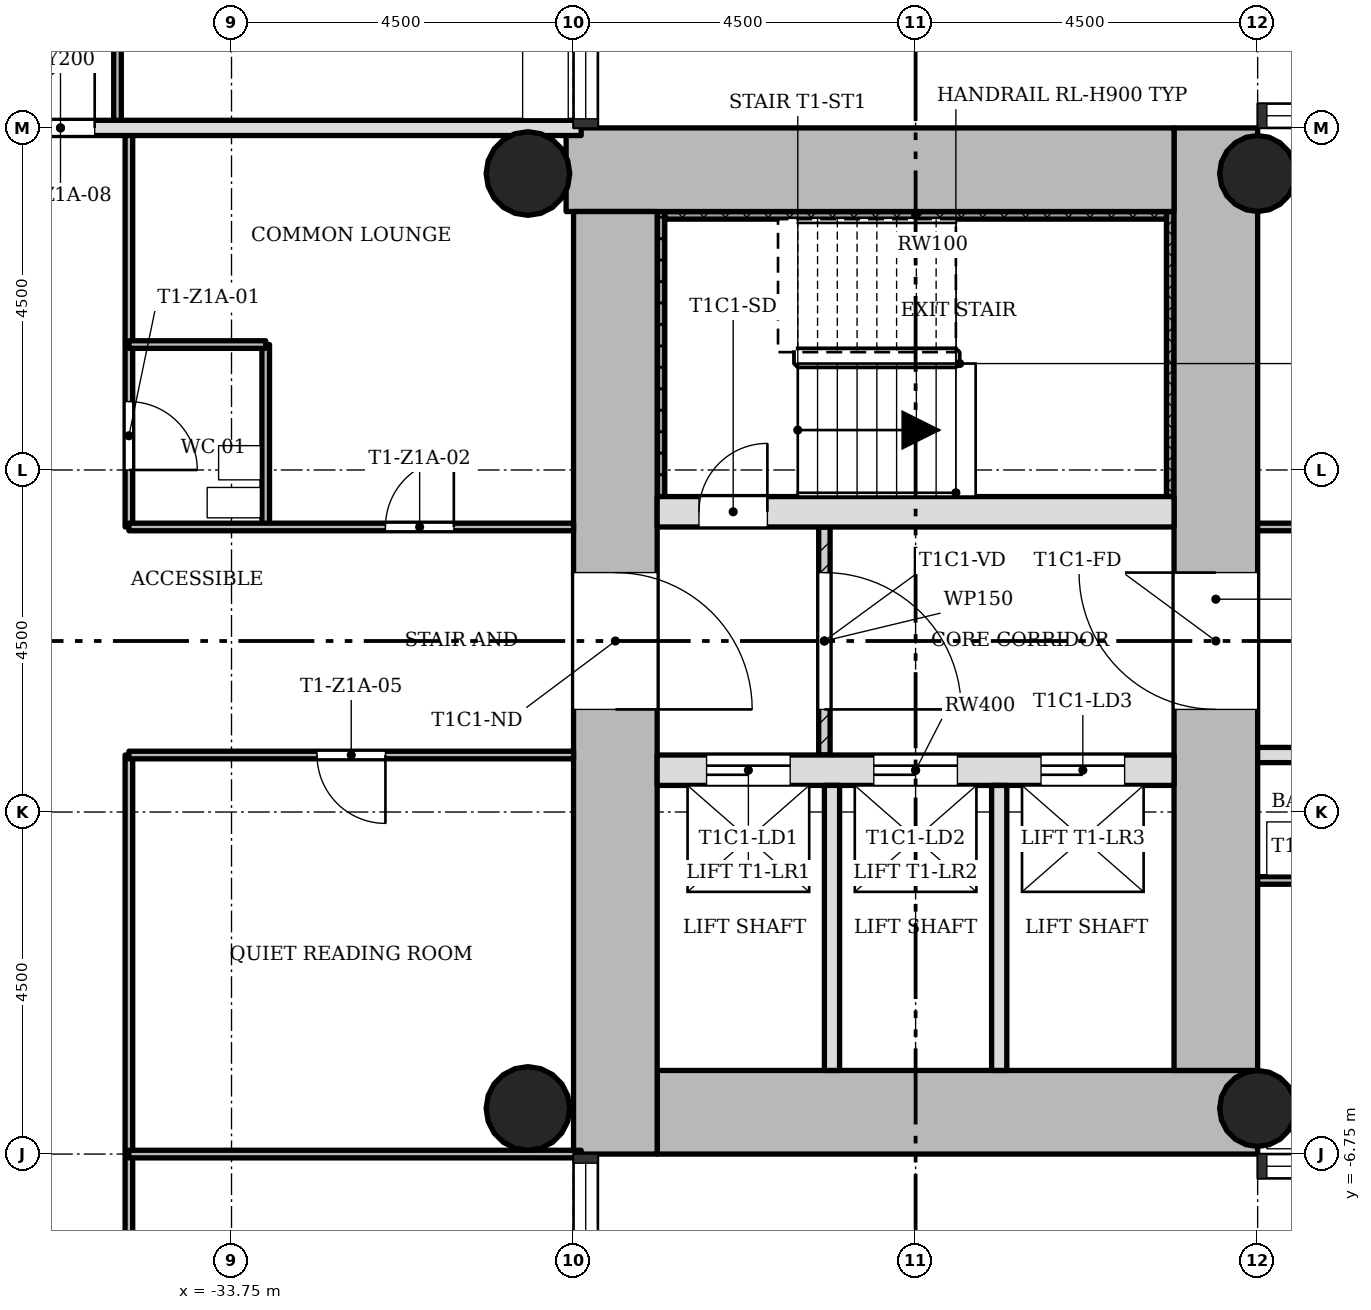
"""IFC4 building model, lengths in metres.
Left out: names, types, materials, properties, quantities, classifications, styles, units other than length and angle.
Written with IfcOpenShell. Run it as: python <this file> out.ifc"""

import sys

from ifc_helpers import new_model, si_unit, direction, frame, frame_2d, origin, origin_2d, place, context, subcontext, project, spatial, rectangle, hollow_circle, extrude, element, fill, save


model = new_model("IFC4")
c1 = context("Model", 3, precision=1e-05, world=origin(), true_north=direction((0.0, 1.0)))
c2 = subcontext(c1, "Body", "Model", "MODEL_VIEW")
j1 = project(units=[si_unit("LENGTHUNIT", "METRE"), si_unit("PLANEANGLEUNIT", "RADIAN")], contexts=[c1])
p1 = place(None, origin())
s1 = spatial("IfcSite", under=j1, at=p1, CompositionType="ELEMENT")
p2 = place(p1, origin())
s2 = spatial("IfcBuilding", under=s1, at=p2, CompositionType="ELEMENT")
p3 = place(p2, frame((0.0, 0.0, 27.9)))
s3 = spatial("IfcBuildingStorey", under=s2, at=p3, CompositionType="ELEMENT", Elevation=27.9)
p4 = place(p3, frame((-28.15, -6.2, 0.0), z_axis=(0.0, 0.0, 1.0), x_axis=(1.0, 0.0, 0.0)))
e1 = element("IfcWall", 1, at=p4, inside=s3, PredefinedType="SHEAR", context=c2, shape_type="SweptSolid", body=[
    extrude(rectangle(XDim=7.9, YDim=1.1, at=frame_2d((3.95, 0.0))), origin(), (0.0, 0.0, 1.0), 3.4),
])
p5 = place(p3, frame((-20.8, -5.65, 0.0), z_axis=(0.0, 0.0, 1.0), x_axis=(0.0, 1.0, 0.0)))
e2 = element("IfcWall", 2, at=p5, inside=s3, PredefinedType="SHEAR", context=c2, shape_type="SweptSolid", body=[
    extrude(rectangle(XDim=12.4, YDim=1.1, at=frame_2d((6.2, 0.0))), origin(), (0.0, 0.0, 1.0), 3.4),
])
p6 = place(p5, frame((4.75, 0.0, 0.0)))
e3 = element("IfcOpeningElement", 3, at=p6, cuts=e2, PredefinedType="OPENING", context=c2, shape_type="SweptSolid", body=[
    extrude(rectangle(XDim=1.8, YDim=2.1, at=frame_2d((0.9, 1.05))), frame((0.0, 0.56, 0.0), z_axis=(0.0, -1.0, 0.0), x_axis=(1.0, 0.0, 0.0)), (0.0, 0.0, 1.0), 1.12),
])
p7 = place(p3, frame((-21.35, 6.2, 0.0), z_axis=(0.0, 0.0, 1.0), x_axis=(-1.0, 0.0, 0.0)))
e4 = element("IfcWall", 4, at=p7, inside=s3, PredefinedType="SHEAR", context=c2, shape_type="SweptSolid", body=[
    extrude(rectangle(XDim=7.998, YDim=1.1, at=frame_2d((3.999, 0.0))), origin(), (0.0, 0.0, 1.0), 3.4),
])
p8 = place(p3, frame((-28.7, 5.65, 0.0), z_axis=(0.0, 0.0, 1.0), x_axis=(0.0, -1.0, 0.0)))
e5 = element("IfcWall", 5, at=p8, inside=s3, PredefinedType="SHEAR", context=c2, shape_type="SweptSolid", body=[
    extrude(rectangle(XDim=12.4, YDim=1.1, at=frame_2d((6.2, 0.0))), origin(), (0.0, 0.0, 1.0), 3.4),
])
p9 = place(p8, frame((4.75, 0.0, 0.0)))
e6 = element("IfcOpeningElement", 6, at=p9, cuts=e5, PredefinedType="OPENING", context=c2, shape_type="SweptSolid", body=[
    extrude(rectangle(XDim=1.8, YDim=2.1, at=frame_2d((0.9, 1.05))), frame((0.0, 0.56, 0.0), z_axis=(0.0, -1.0, 0.0), x_axis=(1.0, 0.0, 0.0)), (0.0, 0.0, 1.0), 1.12),
])
p10 = place(p3, frame((-28.15, -1.7, 0.0), z_axis=(0.0, 0.0, 1.0), x_axis=(1.0, 0.0, 0.0)))
e7 = element("IfcWall", 7, at=p10, inside=s3, PredefinedType="SHEAR", context=c2, shape_type="SweptSolid", body=[
    extrude(rectangle(XDim=6.8, YDim=0.4, at=frame_2d((3.4, 0.0))), origin(), (0.0, 0.0, 1.0), 3.4),
])
p11 = place(p10, frame((0.65, 0.0, 0.0)))
e8 = element("IfcOpeningElement", 8, at=p11, cuts=e7, PredefinedType="OPENING", context=c2, shape_type="SweptSolid", body=[
    extrude(rectangle(XDim=1.1, YDim=2.1, at=frame_2d((0.55, 1.05))), frame((0.0, 0.21, 0.0), z_axis=(0.0, -1.0, 0.0), x_axis=(1.0, 0.0, 0.0)), (0.0, 0.0, 1.0), 0.42),
])
p12 = place(p10, frame((2.85, 0.0, 0.0)))
e9 = element("IfcOpeningElement", 9, at=p12, cuts=e7, PredefinedType="OPENING", context=c2, shape_type="SweptSolid", body=[
    extrude(rectangle(XDim=1.1, YDim=2.1, at=frame_2d((0.55, 1.05))), frame((0.0, 0.21, 0.0), z_axis=(0.0, -1.0, 0.0), x_axis=(1.0, 0.0, 0.0)), (0.0, 0.0, 1.0), 0.42),
])
p13 = place(p10, frame((5.05, 0.0, 0.0)))
e10 = element("IfcOpeningElement", 10, at=p13, cuts=e7, PredefinedType="OPENING", context=c2, shape_type="SweptSolid", body=[
    extrude(rectangle(XDim=1.1, YDim=2.1, at=frame_2d((0.55, 1.05))), frame((0.0, 0.21, 0.0), z_axis=(0.0, -1.0, 0.0), x_axis=(1.0, 0.0, 0.0)), (0.0, 0.0, 1.0), 0.42),
])
p14 = place(p3, frame((-28.15, 1.7, 0.0), z_axis=(0.0, 0.0, 1.0), x_axis=(1.0, 0.0, 0.0)))
e11 = element("IfcWall", 11, at=p14, inside=s3, PredefinedType="SHEAR", context=c2, shape_type="SweptSolid", body=[
    extrude(rectangle(XDim=6.8, YDim=0.4, at=frame_2d((3.4, 0.0))), origin(), (0.0, 0.0, 1.0), 3.4),
])
p15 = place(p14, frame((0.55, 0.0, 0.0)))
e12 = element("IfcOpeningElement", 12, at=p15, cuts=e11, PredefinedType="OPENING", context=c2, shape_type="SweptSolid", body=[
    extrude(rectangle(XDim=0.9, YDim=2.1, at=frame_2d((0.45, 1.05))), frame((0.0, 0.21, 0.0), z_axis=(0.0, -1.0, 0.0), x_axis=(1.0, 0.0, 0.0)), (0.0, 0.0, 1.0), 0.42),
])
for number, where, z_axis, x_axis in (
    (13, (-20.25, -6.15, 0.0), (0.0, 0.0, 1.0), (1.0, 0.0, 0.0)),
    (14, (-20.25, 6.15, 0.0), (0.0, 0.0, 1.0), (1.0, 0.0, 0.0)),
):
    element("IfcColumn", number, at=place(p3, frame(where, z_axis=z_axis, x_axis=x_axis)), inside=s3, PredefinedType="COLUMN", context=c2, shape_type="SweptSolid", body=[
        extrude(hollow_circle(Radius=0.5, WallThickness=0.036, at=origin_2d()), origin(), (0.0, 0.0, 1.0), 3.4),
    ])
for number, where, z_axis, x_axis in (
    (15, (-29.85, -6.15, 0.0), (0.0, 0.0, 1.0), (1.0, 0.0, 0.0)),
    (16, (-29.85, 6.15, 0.0), (0.0, 0.0, 1.0), (1.0, 0.0, 0.0)),
):
    element("IfcColumn", number, at=place(p3, frame(where, z_axis=z_axis, x_axis=x_axis)), inside=s3, PredefinedType="COLUMN", context=c2, shape_type="SweptSolid", body=[
        extrude(hollow_circle(Radius=0.55, WallThickness=0.04, at=origin_2d()), origin(), (0.0, 0.0, 1.0), 3.4),
    ])
p16 = place(p3, frame((-25.95, -1.5, 0.0), z_axis=(0.0, 0.0, 1.0), x_axis=(0.0, 1.0, 0.0)))
e17 = element("IfcWall", 17, at=p16, inside=s3, PredefinedType="PARTITIONING", context=c2, shape_type="SweptSolid", body=[
    extrude(rectangle(XDim=3.0, YDim=0.15, at=frame_2d((1.5, 0.0))), origin(), (0.0, 0.0, 1.0), 3.0),
])
p17 = place(p16, frame((0.6, 0.0, 0.0)))
e18 = element("IfcOpeningElement", 18, at=p17, cuts=e17, PredefinedType="OPENING", context=c2, shape_type="SweptSolid", body=[
    extrude(rectangle(XDim=1.8, YDim=2.1, at=frame_2d((0.9, 1.05))), frame((0.0, 0.085, 0.0), z_axis=(0.0, -1.0, 0.0), x_axis=(1.0, 0.0, 0.0)), (0.0, 0.0, 1.0), 0.17),
])
for number, where, z_axis, x_axis in (
    (19, (-25.85, -5.65, 0.0), (0.0, 0.0, 1.0), (0.0, 1.0, 0.0)),
    (20, (-23.65, -5.65, 0.0), (0.0, 0.0, 1.0), (0.0, 1.0, 0.0)),
):
    element("IfcWall", number, at=place(p3, frame(where, z_axis=z_axis, x_axis=x_axis)), inside=s3, PredefinedType="SOLIDWALL", context=c2, shape_type="SweptSolid", body=[
        extrude(rectangle(XDim=3.75, YDim=0.2, at=frame_2d((1.875, 0.0))), origin(), (0.0, 0.0, 1.0), 3.0),
    ])
p18 = place(p3, frame((-35.25, 6.75, 0.0), z_axis=(0.0, 0.0, 1.0), x_axis=(0.0, 1.0, 0.0)))
e21 = element("IfcWall", 21, at=p18, inside=s3, PredefinedType="PARTITIONING", context=c2, shape_type="SweptSolid", body=[
    extrude(rectangle(XDim=4.5, YDim=0.1, at=frame_2d((2.25, 0.0))), origin(), (0.0, 0.0, 1.0), 3.0),
])
p19 = place(p18, frame((1.8, 0.0, 0.0)))
e22 = element("IfcOpeningElement", 22, at=p19, cuts=e21, PredefinedType="OPENING", context=c2, shape_type="SweptSolid", body=[
    extrude(rectangle(XDim=0.9, YDim=2.1, at=frame_2d((0.45, 1.05))), frame((0.0, 0.06, 0.0), z_axis=(0.0, -1.0, 0.0), x_axis=(1.0, 0.0, 0.0)), (0.0, 0.0, 1.0), 0.12),
])
p20 = place(p3, frame((-35.1, -8.55, 0.0), z_axis=(0.0, 0.0, 1.0), x_axis=(0.0, 1.0, 0.0)))
e23 = element("IfcWall", 23, at=p20, inside=s3, PredefinedType="PARTITIONING", context=c2, shape_type="SweptSolid", body=[
    extrude(rectangle(XDim=7.05, YDim=0.1, at=frame_2d((3.525, 0.0))), origin(), (0.0, 0.0, 1.0), 3.0),
])
p21 = place(p3, frame((-35.1, 1.5, 0.0), z_axis=(0.0, 0.0, 1.0), x_axis=(0.0, 1.0, 0.0)))
e24 = element("IfcWall", 24, at=p21, inside=s3, PredefinedType="PARTITIONING", context=c2, shape_type="SweptSolid", body=[
    extrude(rectangle(XDim=5.25, YDim=0.1, at=frame_2d((2.625, 0.0))), origin(), (0.0, 0.0, 1.0), 3.0),
])
p22 = place(p21, frame((0.75, 0.0, 0.0)))
e25 = element("IfcOpeningElement", 25, at=p22, cuts=e24, PredefinedType="OPENING", context=c2, shape_type="SweptSolid", body=[
    extrude(rectangle(XDim=0.9, YDim=2.1, at=frame_2d((0.45, 1.05))), frame((0.0, 0.06, 0.0), z_axis=(0.0, -1.0, 0.0), x_axis=(1.0, 0.0, 0.0)), (0.0, 0.0, 1.0), 0.12),
])
p23 = place(p3, frame((-33.3, 1.5, 0.0), z_axis=(0.0, 0.0, 1.0), x_axis=(0.0, 1.0, 0.0)))
e26 = element("IfcWall", 26, at=p23, inside=s3, PredefinedType="PARTITIONING", context=c2, shape_type="SweptSolid", body=[
    extrude(rectangle(XDim=2.4, YDim=0.1, at=frame_2d((1.2, 0.0))), origin(), (0.0, 0.0, 1.0), 3.0),
])
p24 = place(p3, frame((-35.1, -6.75, 0.0), z_axis=(0.0, 0.0, 1.0), x_axis=(1.0, 0.0, 0.0)))
e27 = element("IfcWall", 27, at=p24, inside=s3, PredefinedType="PARTITIONING", context=c2, shape_type="SweptSolid", body=[
    extrude(rectangle(XDim=5.95, YDim=0.1, at=frame_2d((2.975, 0.0))), origin(), (0.0, 0.0, 1.0), 3.0),
])
p25 = place(p3, frame((-20.25, -3.15, 0.0), z_axis=(0.0, 0.0, 1.0), x_axis=(1.0, 0.0, 0.0)))
e28 = element("IfcWall", 28, at=p25, inside=s3, PredefinedType="PARTITIONING", context=c2, shape_type="SweptSolid", body=[
    extrude(rectangle(XDim=4.5, YDim=0.1, at=frame_2d((2.25, 0.0))), origin(), (0.0, 0.0, 1.0), 3.0),
])
p26 = place(p25, frame((3.0, 0.0, 0.0)))
e29 = element("IfcOpeningElement", 29, at=p26, cuts=e28, PredefinedType="OPENING", context=c2, shape_type="SweptSolid", body=[
    extrude(rectangle(XDim=0.9, YDim=2.1, at=frame_2d((0.45, 1.05))), frame((0.0, 0.06, 0.0), z_axis=(0.0, -1.0, 0.0), x_axis=(1.0, 0.0, 0.0)), (0.0, 0.0, 1.0), 0.12),
])
p27 = place(p3, frame((-35.1, -1.5, 0.0), z_axis=(0.0, 0.0, 1.0), x_axis=(1.0, 0.0, 0.0)))
e30 = element("IfcWall", 30, at=p27, inside=s3, PredefinedType="PARTITIONING", context=c2, shape_type="SweptSolid", body=[
    extrude(rectangle(XDim=5.85, YDim=0.1, at=frame_2d((2.925, 0.0))), origin(), (0.0, 0.0, 1.0), 3.0),
])
p28 = place(p27, frame((2.475, 0.0, 0.0)))
e31 = element("IfcOpeningElement", 31, at=p28, cuts=e30, PredefinedType="OPENING", context=c2, shape_type="SweptSolid", body=[
    extrude(rectangle(XDim=0.9, YDim=2.1, at=frame_2d((0.45, 1.05))), frame((0.0, 0.06, 0.0), z_axis=(0.0, -1.0, 0.0), x_axis=(1.0, 0.0, 0.0)), (0.0, 0.0, 1.0), 0.12),
])
p29 = place(p3, frame((-20.25, -1.5, 0.0), z_axis=(0.0, 0.0, 1.0), x_axis=(1.0, 0.0, 0.0)))
e32 = element("IfcWall", 32, at=p29, inside=s3, PredefinedType="SOLIDWALL", context=c2, shape_type="SweptSolid", body=[
    extrude(rectangle(XDim=4.5, YDim=0.2, at=frame_2d((2.25, 0.0))), origin(), (0.0, 0.0, 1.0), 3.0),
])
p30 = place(p29, frame((3.0, 0.0, 0.0)))
e33 = element("IfcOpeningElement", 33, at=p30, cuts=e32, PredefinedType="OPENING", context=c2, shape_type="SweptSolid", body=[
    extrude(rectangle(XDim=0.9, YDim=2.1, at=frame_2d((0.45, 1.05))), frame((0.0, 0.11, 0.0), z_axis=(0.0, -1.0, 0.0), x_axis=(1.0, 0.0, 0.0)), (0.0, 0.0, 1.0), 0.22),
])
p31 = place(p3, frame((-35.1, 1.5, 0.0), z_axis=(0.0, 0.0, 1.0), x_axis=(1.0, 0.0, 0.0)))
e34 = element("IfcWall", 34, at=p31, inside=s3, PredefinedType="PARTITIONING", context=c2, shape_type="SweptSolid", body=[
    extrude(rectangle(XDim=5.85, YDim=0.1, at=frame_2d((2.925, 0.0))), origin(), (0.0, 0.0, 1.0), 3.0),
])
p32 = place(p31, frame((3.375, 0.0, 0.0)))
e35 = element("IfcOpeningElement", 35, at=p32, cuts=e34, PredefinedType="OPENING", context=c2, shape_type="SweptSolid", body=[
    extrude(rectangle(XDim=0.9, YDim=2.1, at=frame_2d((0.45, 1.05))), frame((0.0, 0.06, 0.0), z_axis=(0.0, -1.0, 0.0), x_axis=(1.0, 0.0, 0.0)), (0.0, 0.0, 1.0), 0.12),
])
p33 = place(p3, frame((-20.25, 1.5, 0.0), z_axis=(0.0, 0.0, 1.0), x_axis=(1.0, 0.0, 0.0)))
e36 = element("IfcWall", 36, at=p33, inside=s3, PredefinedType="PARTITIONING", context=c2, shape_type="SweptSolid", body=[
    extrude(rectangle(XDim=4.5, YDim=0.1, at=frame_2d((2.25, 0.0))), origin(), (0.0, 0.0, 1.0), 3.0),
])
p34 = place(p33, frame((1.8, 0.0, 0.0)))
e37 = element("IfcOpeningElement", 37, at=p34, cuts=e36, PredefinedType="OPENING", context=c2, shape_type="SweptSolid", body=[
    extrude(rectangle(XDim=0.9, YDim=2.1, at=frame_2d((0.45, 1.05))), frame((0.0, 0.06, 0.0), z_axis=(0.0, -1.0, 0.0), x_axis=(1.0, 0.0, 0.0)), (0.0, 0.0, 1.0), 0.12),
])
p35 = place(p3, frame((-35.1, 3.9, 0.0), z_axis=(0.0, 0.0, 1.0), x_axis=(1.0, 0.0, 0.0)))
e38 = element("IfcWall", 38, at=p35, inside=s3, PredefinedType="PARTITIONING", context=c2, shape_type="SweptSolid", body=[
    extrude(rectangle(XDim=1.8, YDim=0.1, at=frame_2d((0.9, 0.0))), origin(), (0.0, 0.0, 1.0), 3.0),
])
p36 = place(p3, frame((-42.85, 6.75, 0.0), z_axis=(0.0, 0.0, 1.0), x_axis=(1.0, 0.0, 0.0)))
e39 = element("IfcWall", 39, at=p36, inside=s3, PredefinedType="SOLIDWALL", context=c2, shape_type="SweptSolid", body=[
    extrude(rectangle(XDim=13.7, YDim=0.2, at=frame_2d((6.85, 0.0))), origin(), (0.0, 0.0, 1.0), 3.0),
])
p37 = place(p36, frame((6.4, 0.0, 0.0)))
e40 = element("IfcOpeningElement", 40, at=p37, cuts=e39, PredefinedType="OPENING", context=c2, shape_type="SweptSolid", body=[
    extrude(rectangle(XDim=0.9, YDim=2.1, at=frame_2d((0.45, 1.05))), frame((0.0, 0.11, 0.0), z_axis=(0.0, -1.0, 0.0), x_axis=(1.0, 0.0, 0.0)), (0.0, 0.0, 1.0), 0.22),
])
p38 = place(p3, frame((-21.4, 1.9, 0.0), z_axis=(0.0, 0.0, 1.0), x_axis=(0.0, 1.0, 0.0)))
e41 = element("IfcWall", 41, at=p38, inside=s3, PredefinedType="SHEAR", context=c2, shape_type="SweptSolid", body=[
    extrude(rectangle(XDim=3.75, YDim=0.1, at=frame_2d((1.875, 0.0))), origin(), (0.0, 0.0, 1.0), 3.4),
])
p39 = place(p3, frame((-28.05, 5.6, 0.0), z_axis=(0.0, 0.0, 1.0), x_axis=(1.0, 0.0, 0.0)))
e42 = element("IfcWall", 42, at=p39, inside=s3, PredefinedType="SHEAR", context=c2, shape_type="SweptSolid", body=[
    extrude(rectangle(XDim=6.6, YDim=0.1, at=frame_2d((3.3, 0.0))), origin(), (0.0, 0.0, 1.0), 3.4),
])
p40 = place(p3, frame((-28.1, 1.9, 0.0), z_axis=(0.0, 0.0, 1.0), x_axis=(0.0, 1.0, 0.0)))
e43 = element("IfcWall", 43, at=p40, inside=s3, PredefinedType="SHEAR", context=c2, shape_type="SweptSolid", body=[
    extrude(rectangle(XDim=3.75, YDim=0.1, at=frame_2d((1.875, 0.0))), origin(), (0.0, 0.0, 1.0), 3.4),
])
p41 = place(p17, origin())
e44 = element("IfcDoor", 44, at=p41, inside=s3, OperationType="SINGLE_SWING_LEFT", PredefinedType="DOOR", context=c2, shape_type="SweptSolid", body=[
    extrude(rectangle(XDim=1.8, YDim=2.1, at=frame_2d((0.9, 1.05))), frame((0.0, 0.025, 0.0), z_axis=(0.0, -1.0, 0.0), x_axis=(1.0, 0.0, 0.0)), (0.0, 0.0, 1.0), 0.05),
])
fill(e18, e44)
p42 = place(p22, origin())
e45 = element("IfcDoor", 45, at=p42, inside=s3, OperationType="SINGLE_SWING_LEFT", PredefinedType="DOOR", context=c2, shape_type="SweptSolid", body=[
    extrude(rectangle(XDim=0.9, YDim=2.1, at=frame_2d((0.45, 1.05))), frame((0.0, 0.025, 0.0), z_axis=(0.0, -1.0, 0.0), x_axis=(1.0, 0.0, 0.0)), (0.0, 0.0, 1.0), 0.05),
])
fill(e25, e45)
p43 = place(p32, origin())
e46 = element("IfcDoor", 46, at=p43, inside=s3, OperationType="SINGLE_SWING_LEFT", PredefinedType="DOOR", context=c2, shape_type="SweptSolid", body=[
    extrude(rectangle(XDim=0.9, YDim=2.1, at=frame_2d((0.45, 1.05))), frame((0.0, 0.025, 0.0), z_axis=(0.0, -1.0, 0.0), x_axis=(1.0, 0.0, 0.0)), (0.0, 0.0, 1.0), 0.05),
])
fill(e35, e46)
p44 = place(p28, origin())
e47 = element("IfcDoor", 47, at=p44, inside=s3, OperationType="SINGLE_SWING_RIGHT", PredefinedType="DOOR", context=c2, shape_type="SweptSolid", body=[
    extrude(rectangle(XDim=0.9, YDim=2.1, at=frame_2d((0.45, 1.05))), frame((0.0, 0.025, 0.0), z_axis=(0.0, -1.0, 0.0), x_axis=(1.0, 0.0, 0.0)), (0.0, 0.0, 1.0), 0.05),
])
fill(e31, e47)
p45 = place(p37, origin())
e48 = element("IfcDoor", 48, at=p45, inside=s3, OperationType="SINGLE_SWING_LEFT", PredefinedType="DOOR", context=c2, shape_type="SweptSolid", body=[
    extrude(rectangle(XDim=0.9, YDim=2.1, at=frame_2d((0.45, 1.05))), frame((0.0, 0.025, 0.0), z_axis=(0.0, -1.0, 0.0), x_axis=(1.0, 0.0, 0.0)), (0.0, 0.0, 1.0), 0.05),
])
fill(e40, e48)
p46 = place(p15, origin())
e49 = element("IfcDoor", 49, at=p46, inside=s3, OperationType="SINGLE_SWING_LEFT", PredefinedType="DOOR", context=c2, shape_type="SweptSolid", body=[
    extrude(rectangle(XDim=0.9, YDim=2.1, at=frame_2d((0.45, 1.05))), frame((0.0, 0.025, 0.0), z_axis=(0.0, -1.0, 0.0), x_axis=(1.0, 0.0, 0.0)), (0.0, 0.0, 1.0), 0.05),
])
fill(e12, e49)
p47 = place(p11, origin())
e50 = element("IfcDoor", 50, at=p47, inside=s3, OperationType="SLIDING_TO_LEFT", PredefinedType="DOOR", context=c2, shape_type="SweptSolid", body=[
    extrude(rectangle(XDim=1.1, YDim=2.1, at=frame_2d((0.55, 1.05))), frame((0.0, 0.025, 0.0), z_axis=(0.0, -1.0, 0.0), x_axis=(1.0, 0.0, 0.0)), (0.0, 0.0, 1.0), 0.05),
])
fill(e8, e50)
p48 = place(p12, origin())
e51 = element("IfcDoor", 51, at=p48, inside=s3, OperationType="SLIDING_TO_LEFT", PredefinedType="DOOR", context=c2, shape_type="SweptSolid", body=[
    extrude(rectangle(XDim=1.1, YDim=2.1, at=frame_2d((0.55, 1.05))), frame((0.0, 0.025, 0.0), z_axis=(0.0, -1.0, 0.0), x_axis=(1.0, 0.0, 0.0)), (0.0, 0.0, 1.0), 0.05),
])
fill(e9, e51)
p49 = place(p13, origin())
e52 = element("IfcDoor", 52, at=p49, inside=s3, OperationType="SLIDING_TO_LEFT", PredefinedType="DOOR", context=c2, shape_type="SweptSolid", body=[
    extrude(rectangle(XDim=1.1, YDim=2.1, at=frame_2d((0.55, 1.05))), frame((0.0, 0.025, 0.0), z_axis=(0.0, -1.0, 0.0), x_axis=(1.0, 0.0, 0.0)), (0.0, 0.0, 1.0), 0.05),
])
fill(e10, e52)
p50 = place(p9, origin())
e53 = element("IfcDoor", 53, at=p50, inside=s3, OperationType="SINGLE_SWING_LEFT", PredefinedType="DOOR", context=c2, shape_type="SweptSolid", body=[
    extrude(rectangle(XDim=1.8, YDim=2.1, at=frame_2d((0.9, 1.05))), frame((0.0, 0.025, 0.0), z_axis=(0.0, -1.0, 0.0), x_axis=(1.0, 0.0, 0.0)), (0.0, 0.0, 1.0), 0.05),
])
fill(e6, e53)
p51 = place(p6, origin())
e54 = element("IfcDoor", 54, at=p51, inside=s3, OperationType="SINGLE_SWING_LEFT", PredefinedType="DOOR", context=c2, shape_type="SweptSolid", body=[
    extrude(rectangle(XDim=1.8, YDim=2.1, at=frame_2d((0.9, 1.05))), frame((0.0, 0.025, 0.0), z_axis=(0.0, -1.0, 0.0), x_axis=(1.0, 0.0, 0.0)), (0.0, 0.0, 1.0), 0.05),
])
fill(e3, e54)
save(model, sys.argv[1])
